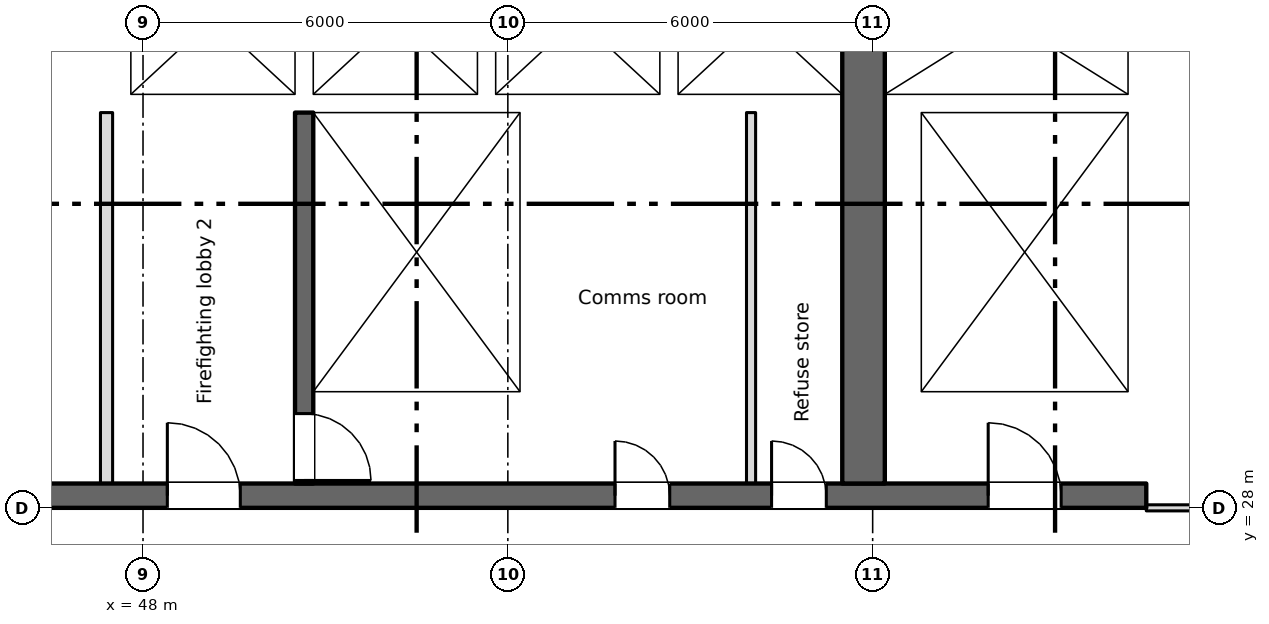
"""IFC4 building model, lengths in metres.
Left out: names, types, materials, properties, quantities, classifications, styles, units other than length and angle.
Written with IfcOpenShell. Run it as: python <this file> out.ifc"""

import sys

from ifc_helpers import new_model, si_unit, direction, frame, frame_2d, origin, place, context, subcontext, project, spatial, rectangle, extrude, element, fill, save


model = new_model("IFC4")
c1 = context("Model", 3, precision=1e-05, world=origin(), true_north=direction((0.0, 1.0)))
c2 = subcontext(c1, "Body", "Model", "MODEL_VIEW")
j1 = project(units=[si_unit("LENGTHUNIT", "METRE"), si_unit("PLANEANGLEUNIT", "RADIAN")], contexts=[c1])
p1 = place(None, origin())
s1 = spatial("IfcSite", under=j1, at=p1, CompositionType="ELEMENT")
p2 = place(p1, origin())
s2 = spatial("IfcBuilding", under=s1, at=p2, CompositionType="ELEMENT")
p3 = place(p2, frame((0.0, 0.0, 178.0)))
s3 = spatial("IfcBuildingStorey", under=s2, at=p3, CompositionType="ELEMENT", Elevation=178.0)
p4 = place(p3, frame((6.6, 28.2, 0.0), z_axis=(0.0, 0.0, 1.0), x_axis=(1.0, 0.0, 0.0)))
e1 = element("IfcWall", 1, at=p4, inside=s3, PredefinedType="SHEAR", context=c2, shape_type="SweptSolid", body=[
    extrude(rectangle(XDim=57.9, YDim=0.4, at=frame_2d((28.95, 0.0))), origin(), (0.0, 0.0, 1.0), 3.35),
])
p5 = place(p4, frame((12.163, 0.0, 0.0)))
e2 = element("IfcOpeningElement", 2, at=p5, cuts=e1, PredefinedType="OPENING", context=c2, shape_type="SweptSolid", body=[
    extrude(rectangle(XDim=0.9, YDim=2.1, at=frame_2d((0.45, 1.05))), frame((0.0, 0.21, 0.0), z_axis=(0.0, -1.0, 0.0), x_axis=(1.0, 0.0, 0.0)), (0.0, 0.0, 1.0), 0.42),
])
p6 = place(p4, frame((14.738, 0.0, 0.0)))
e3 = element("IfcOpeningElement", 3, at=p6, cuts=e1, PredefinedType="OPENING", context=c2, shape_type="SweptSolid", body=[
    extrude(rectangle(XDim=0.9, YDim=2.1, at=frame_2d((0.45, 1.05))), frame((0.0, 0.21, 0.0), z_axis=(0.0, -1.0, 0.0), x_axis=(1.0, 0.0, 0.0)), (0.0, 0.0, 1.0), 0.42),
])
p7 = place(p4, frame((49.163, 0.0, 0.0)))
e4 = element("IfcOpeningElement", 4, at=p7, cuts=e1, PredefinedType="OPENING", context=c2, shape_type="SweptSolid", body=[
    extrude(rectangle(XDim=0.9, YDim=2.1, at=frame_2d((0.45, 1.05))), frame((0.0, 0.21, 0.0), z_axis=(0.0, -1.0, 0.0), x_axis=(1.0, 0.0, 0.0)), (0.0, 0.0, 1.0), 0.42),
])
p8 = place(p4, frame((51.738, 0.0, 0.0)))
e5 = element("IfcOpeningElement", 5, at=p8, cuts=e1, PredefinedType="OPENING", context=c2, shape_type="SweptSolid", body=[
    extrude(rectangle(XDim=0.9, YDim=2.1, at=frame_2d((0.45, 1.05))), frame((0.0, 0.21, 0.0), z_axis=(0.0, -1.0, 0.0), x_axis=(1.0, 0.0, 0.0)), (0.0, 0.0, 1.0), 0.42),
])
p9 = place(p4, frame((1.45, 0.0, 0.0)))
e6 = element("IfcOpeningElement", 6, at=p9, cuts=e1, PredefinedType="OPENING", context=c2, shape_type="SweptSolid", body=[
    extrude(rectangle(XDim=0.9, YDim=2.1, at=frame_2d((0.45, 1.05))), frame((0.0, 0.21, 0.0), z_axis=(0.0, -1.0, 0.0), x_axis=(1.0, 0.0, 0.0)), (0.0, 0.0, 1.0), 0.42),
])
p10 = place(p4, frame((4.8, 0.0, 0.0)))
e7 = element("IfcOpeningElement", 7, at=p10, cuts=e1, PredefinedType="OPENING", context=c2, shape_type="SweptSolid", body=[
    extrude(rectangle(XDim=1.2, YDim=2.1, at=frame_2d((0.6, 1.05))), frame((0.0, 0.21, 0.0), z_axis=(0.0, -1.0, 0.0), x_axis=(1.0, 0.0, 0.0)), (0.0, 0.0, 1.0), 0.42),
])
p11 = place(p4, frame((31.8, 0.0, 0.0)))
e8 = element("IfcOpeningElement", 8, at=p11, cuts=e1, PredefinedType="OPENING", context=c2, shape_type="SweptSolid", body=[
    extrude(rectangle(XDim=1.2, YDim=2.1, at=frame_2d((0.6, 1.05))), frame((0.0, 0.21, 0.0), z_axis=(0.0, -1.0, 0.0), x_axis=(1.0, 0.0, 0.0)), (0.0, 0.0, 1.0), 0.42),
])
p12 = place(p4, frame((55.3, 0.0, 0.0)))
e9 = element("IfcOpeningElement", 9, at=p12, cuts=e1, PredefinedType="OPENING", context=c2, shape_type="SweptSolid", body=[
    extrude(rectangle(XDim=1.2, YDim=2.1, at=frame_2d((0.6, 1.05))), frame((0.0, 0.21, 0.0), z_axis=(0.0, -1.0, 0.0), x_axis=(1.0, 0.0, 0.0)), (0.0, 0.0, 1.0), 0.42),
])
p13 = place(p4, frame((21.8, 0.0, 0.0)))
e10 = element("IfcOpeningElement", 10, at=p13, cuts=e1, PredefinedType="OPENING", context=c2, shape_type="SweptSolid", body=[
    extrude(rectangle(XDim=1.2, YDim=2.1, at=frame_2d((0.6, 1.05))), frame((0.0, 0.21, 0.0), z_axis=(0.0, -1.0, 0.0), x_axis=(1.0, 0.0, 0.0)), (0.0, 0.0, 1.0), 0.42),
])
p14 = place(p4, frame((41.8, 0.0, 0.0)))
e11 = element("IfcOpeningElement", 11, at=p14, cuts=e1, PredefinedType="OPENING", context=c2, shape_type="SweptSolid", body=[
    extrude(rectangle(XDim=1.2, YDim=2.1, at=frame_2d((0.6, 1.05))), frame((0.0, 0.21, 0.0), z_axis=(0.0, -1.0, 0.0), x_axis=(1.0, 0.0, 0.0)), (0.0, 0.0, 1.0), 0.42),
])
p15 = place(p4, frame((24.95, 0.0, 0.0)))
e12 = element("IfcOpeningElement", 12, at=p15, cuts=e1, PredefinedType="OPENING", context=c2, shape_type="SweptSolid", body=[
    extrude(rectangle(XDim=2.4, YDim=2.1, at=frame_2d((1.2, 1.05))), frame((0.0, 0.21, 0.0), z_axis=(0.0, -1.0, 0.0), x_axis=(1.0, 0.0, 0.0)), (0.0, 0.0, 1.0), 0.42),
])
p16 = place(p4, frame((37.45, 0.0, 0.0)))
e13 = element("IfcOpeningElement", 13, at=p16, cuts=e1, PredefinedType="OPENING", context=c2, shape_type="SweptSolid", body=[
    extrude(rectangle(XDim=2.4, YDim=2.1, at=frame_2d((1.2, 1.05))), frame((0.0, 0.21, 0.0), z_axis=(0.0, -1.0, 0.0), x_axis=(1.0, 0.0, 0.0)), (0.0, 0.0, 1.0), 0.42),
])
p17 = place(p4, frame((8.1, 0.0, 0.0)))
e14 = element("IfcOpeningElement", 14, at=p17, cuts=e1, PredefinedType="OPENING", context=c2, shape_type="SweptSolid", body=[
    extrude(rectangle(XDim=2.4, YDim=2.1, at=frame_2d((1.2, 1.05))), frame((0.0, 0.21, 0.0), z_axis=(0.0, -1.0, 0.0), x_axis=(1.0, 0.0, 0.0)), (0.0, 0.0, 1.0), 0.42),
])
p18 = place(p4, frame((28.95, 0.0, 0.0)))
e15 = element("IfcOpeningElement", 15, at=p18, cuts=e1, PredefinedType="OPENING", context=c2, shape_type="SweptSolid", body=[
    extrude(rectangle(XDim=0.9, YDim=2.1, at=frame_2d((0.45, 1.05))), frame((0.0, 0.21, 0.0), z_axis=(0.0, -1.0, 0.0), x_axis=(1.0, 0.0, 0.0)), (0.0, 0.0, 1.0), 0.42),
])
p19 = place(p4, frame((34.95, 0.0, 0.0)))
e16 = element("IfcOpeningElement", 16, at=p19, cuts=e1, PredefinedType="OPENING", context=c2, shape_type="SweptSolid", body=[
    extrude(rectangle(XDim=0.9, YDim=2.1, at=frame_2d((0.45, 1.05))), frame((0.0, 0.21, 0.0), z_axis=(0.0, -1.0, 0.0), x_axis=(1.0, 0.0, 0.0)), (0.0, 0.0, 1.0), 0.42),
])
p20 = place(p3, frame((64.35, 34.8, 0.0), z_axis=(0.0, 0.0, 1.0), x_axis=(0.0, 1.0, 0.0)))
e17 = element("IfcWall", 17, at=p20, inside=s3, PredefinedType="SHEAR", context=c2, shape_type="SweptSolid", body=[
    extrude(rectangle(XDim=10.5, YDim=0.3, at=frame_2d((5.25, 0.0))), origin(), (0.0, 0.0, 1.0), 3.35),
])
p21 = place(p3, frame((59.85, 28.4, 0.0), z_axis=(0.0, 0.0, 1.0), x_axis=(0.0, 1.0, 0.0)))
e18 = element("IfcWall", 18, at=p21, inside=s3, PredefinedType="SHEAR", context=c2, shape_type="SweptSolid", body=[
    extrude(rectangle(XDim=16.9, YDim=0.7, at=frame_2d((8.45, 0.0))), origin(), (0.0, 0.0, 1.0), 3.35),
])
p22 = place(p21, frame((9.6, 0.0, 0.0)))
e19 = element("IfcOpeningElement", 19, at=p22, cuts=e18, PredefinedType="OPENING", context=c2, shape_type="SweptSolid", body=[
    extrude(rectangle(XDim=2.0, YDim=2.1, at=frame_2d((1.0, 1.05))), frame((0.0, 0.36, 0.0), z_axis=(0.0, -1.0, 0.0), x_axis=(1.0, 0.0, 0.0)), (0.0, 0.0, 1.0), 0.72),
])
p23 = place(p21, frame((15.4, 0.0, 0.0)))
e20 = element("IfcOpeningElement", 20, at=p23, cuts=e18, PredefinedType="OPENING", context=c2, shape_type="SweptSolid", body=[
    extrude(rectangle(XDim=1.2, YDim=2.1, at=frame_2d((0.6, 1.05))), frame((0.0, 0.36, 0.0), z_axis=(0.0, -1.0, 0.0), x_axis=(1.0, 0.0, 0.0)), (0.0, 0.0, 1.0), 0.72),
])
p24 = place(p3, frame((50.65, 34.5, 0.0), z_axis=(0.0, 0.0, 1.0), x_axis=(0.0, -1.0, 0.0)))
e21 = element("IfcWall", 21, at=p24, inside=s3, PredefinedType="SHEAR", context=c2, shape_type="SweptSolid", body=[
    extrude(rectangle(XDim=6.1, YDim=0.3, at=frame_2d((3.05, 0.0))), origin(), (0.0, 0.0, 1.0), 3.35),
])
p25 = place(p24, frame((4.95, 0.0, 0.0)))
e22 = element("IfcOpeningElement", 22, at=p25, cuts=e21, PredefinedType="OPENING", context=c2, shape_type="SweptSolid", body=[
    extrude(rectangle(XDim=1.1, YDim=2.1, at=frame_2d((0.55, 1.05))), frame((0.0, 0.16, 0.0), z_axis=(0.0, -1.0, 0.0), x_axis=(1.0, 0.0, 0.0)), (0.0, 0.0, 1.0), 0.32),
])
p26 = place(p3, frame((54.35, 28.4, 0.0), z_axis=(0.0, 0.0, 1.0), x_axis=(0.0, 1.0, 0.0)))
e23 = element("IfcWall", 23, at=p26, inside=s3, PredefinedType="SHEAR", context=c2, shape_type="SweptSolid", body=[
    extrude(rectangle(XDim=6.1, YDim=0.3, at=frame_2d((3.05, 0.0))), origin(), (0.0, 0.0, 1.0), 3.35),
])
p27 = place(p3, frame((60.5, 28.4, 0.0), z_axis=(0.0, 0.0, 1.0), x_axis=(0.0, 1.0, 0.0)))
e24 = element("IfcWall", 24, at=p27, inside=s3, PredefinedType="SHEAR", context=c2, shape_type="SweptSolid", body=[
    extrude(rectangle(XDim=6.1, YDim=0.6, at=frame_2d((3.05, 0.0))), origin(), (0.0, 0.0, 1.0), 3.35),
])
p28 = place(p3, frame((64.35, 28.4, 0.0), z_axis=(0.0, 0.0, 1.0), x_axis=(0.0, 1.0, 0.0)))
e25 = element("IfcWall", 25, at=p28, inside=s3, PredefinedType="SHEAR", context=c2, shape_type="SweptSolid", body=[
    extrude(rectangle(XDim=6.1, YDim=0.3, at=frame_2d((3.05, 0.0))), origin(), (0.0, 0.0, 1.0), 3.35),
])
p29 = place(p3, frame((47.3, 34.65, 0.0), z_axis=(0.0, 0.0, 1.0), x_axis=(1.0, 0.0, 0.0)))
e26 = element("IfcWall", 26, at=p29, inside=s3, PredefinedType="SHEAR", context=c2, shape_type="SweptSolid", body=[
    extrude(rectangle(XDim=12.2, YDim=0.3, at=frame_2d((6.1, 0.0))), origin(), (0.0, 0.0, 1.0), 3.35),
])
p30 = place(p29, frame((1.3, 0.0, 0.0)))
e27 = element("IfcOpeningElement", 27, at=p30, cuts=e26, PredefinedType="OPENING", context=c2, shape_type="SweptSolid", body=[
    extrude(rectangle(XDim=1.1, YDim=2.1, at=frame_2d((0.55, 1.05))), frame((0.0, 0.16, 0.0), z_axis=(0.0, -1.0, 0.0), x_axis=(1.0, 0.0, 0.0)), (0.0, 0.0, 1.0), 0.32),
])
p31 = place(p3, frame((60.2, 34.65, 0.0), z_axis=(0.0, 0.0, 1.0), x_axis=(1.0, 0.0, 0.0)))
e28 = element("IfcWall", 28, at=p31, inside=s3, PredefinedType="SHEAR", context=c2, shape_type="SweptSolid", body=[
    extrude(rectangle(XDim=4.3, YDim=0.3, at=frame_2d((2.15, 0.0))), origin(), (0.0, 0.0, 1.0), 3.35),
])
p32 = place(p3, frame((47.55, 34.8, 0.0), z_axis=(0.0, 0.0, 1.0), x_axis=(0.0, 1.0, 0.0)))
e29 = element("IfcWall", 29, at=p32, inside=s3, PredefinedType="SHEAR", context=c2, shape_type="SweptSolid", body=[
    extrude(rectangle(XDim=2.5, YDim=0.5, at=frame_2d((1.25, 0.0))), origin(), (0.0, 0.0, 1.0), 3.35),
])
for number, where, z_axis, x_axis in (
    (30, (50.65, 34.8, 0.0), (0.0, 0.0, 1.0), (0.0, 1.0, 0.0)),
    (31, (53.65, 34.8, 0.0), (0.0, 0.0, 1.0), (0.0, 1.0, 0.0)),
    (32, (56.65, 34.8, 0.0), (0.0, 0.0, 1.0), (0.0, 1.0, 0.0)),
):
    element("IfcWall", number, at=place(p3, frame(where, z_axis=z_axis, x_axis=x_axis)), inside=s3, PredefinedType="SHEAR", context=c2, shape_type="SweptSolid", body=[
        extrude(rectangle(XDim=2.5, YDim=0.3, at=frame_2d((1.25, 0.0))), origin(), (0.0, 0.0, 1.0), 3.35),
    ])
p33 = place(p3, frame((47.4, 28.4, 0.0), z_axis=(0.0, 0.0, 1.0), x_axis=(0.0, 1.0, 0.0)))
e33 = element("IfcWall", 33, at=p33, inside=s3, PredefinedType="PARTITIONING", context=c2, shape_type="SweptSolid", body=[
    extrude(rectangle(XDim=6.1, YDim=0.2, at=frame_2d((3.05, 0.0))), origin(), (0.0, 0.0, 1.0), 3.35),
])
p34 = place(p3, frame((58.0, 28.4, 0.0), z_axis=(0.0, 0.0, 1.0), x_axis=(0.0, 1.0, 0.0)))
e34 = element("IfcWall", 34, at=p34, inside=s3, PredefinedType="PARTITIONING", context=c2, shape_type="SweptSolid", body=[
    extrude(rectangle(XDim=6.1, YDim=0.15, at=frame_2d((3.05, 0.0))), origin(), (0.0, 0.0, 1.0), 3.35),
])
p35 = place(p3, frame((64.5, 28.0, 0.0), z_axis=(0.0, 0.0, 1.0), x_axis=(1.0, 0.0, 0.0)))
e35 = element("IfcWall", 35, at=p35, inside=s3, PredefinedType="PARTITIONING", context=c2, shape_type="SweptSolid", body=[
    extrude(rectangle(XDim=6.9, YDim=0.1, at=frame_2d((3.45, 0.0))), origin(), (0.0, 0.0, 1.0), 3.35),
])
p36 = place(p35, frame((2.95, 0.0, 0.0)))
e36 = element("IfcOpeningElement", 36, at=p36, cuts=e35, PredefinedType="OPENING", context=c2, shape_type="SweptSolid", body=[
    extrude(rectangle(XDim=1.0, YDim=2.1, at=frame_2d((0.5, 1.05))), frame((0.0, 0.06, 0.0), z_axis=(0.0, -1.0, 0.0), x_axis=(1.0, 0.0, 0.0)), (0.0, 0.0, 1.0), 0.12),
])
p37 = place(p7, origin())
e37 = element("IfcDoor", 37, at=p37, inside=s3, OperationType="SINGLE_SWING_LEFT", PredefinedType="DOOR", context=c2, shape_type="SweptSolid", body=[
    extrude(rectangle(XDim=0.9, YDim=2.1, at=frame_2d((0.45, 1.05))), frame((0.0, 0.025, 0.0), z_axis=(0.0, -1.0, 0.0), x_axis=(1.0, 0.0, 0.0)), (0.0, 0.0, 1.0), 0.05),
])
fill(e4, e37)
p38 = place(p8, origin())
e38 = element("IfcDoor", 38, at=p38, inside=s3, OperationType="SINGLE_SWING_LEFT", PredefinedType="DOOR", context=c2, shape_type="SweptSolid", body=[
    extrude(rectangle(XDim=0.9, YDim=2.1, at=frame_2d((0.45, 1.05))), frame((0.0, 0.025, 0.0), z_axis=(0.0, -1.0, 0.0), x_axis=(1.0, 0.0, 0.0)), (0.0, 0.0, 1.0), 0.05),
])
fill(e5, e38)
p39 = place(p30, origin())
e39 = element("IfcDoor", 39, at=p39, inside=s3, OperationType="SLIDING_TO_LEFT", PredefinedType="DOOR", context=c2, shape_type="SweptSolid", body=[
    extrude(rectangle(XDim=1.1, YDim=2.1, at=frame_2d((0.55, 1.05))), frame((0.0, 0.025, 0.0), z_axis=(0.0, -1.0, 0.0), x_axis=(1.0, 0.0, 0.0)), (0.0, 0.0, 1.0), 0.05),
])
fill(e27, e39)
p40 = place(p25, origin())
e40 = element("IfcDoor", 40, at=p40, inside=s3, OperationType="SINGLE_SWING_RIGHT", PredefinedType="DOOR", context=c2, shape_type="SweptSolid", body=[
    extrude(rectangle(XDim=1.1, YDim=2.1, at=frame_2d((0.55, 1.05))), frame((0.0, 0.025, 0.0), z_axis=(0.0, -1.0, 0.0), x_axis=(1.0, 0.0, 0.0)), (0.0, 0.0, 1.0), 0.05),
])
fill(e22, e40)
p41 = place(p12, origin())
e41 = element("IfcDoor", 41, at=p41, inside=s3, OperationType="SINGLE_SWING_LEFT", PredefinedType="DOOR", context=c2, shape_type="SweptSolid", body=[
    extrude(rectangle(XDim=1.2, YDim=2.1, at=frame_2d((0.6, 1.05))), frame((0.0, 0.025, 0.0), z_axis=(0.0, -1.0, 0.0), x_axis=(1.0, 0.0, 0.0)), (0.0, 0.0, 1.0), 0.05),
])
fill(e9, e41)
p42 = place(p14, origin())
e42 = element("IfcDoor", 42, at=p42, inside=s3, OperationType="SINGLE_SWING_LEFT", PredefinedType="DOOR", context=c2, shape_type="SweptSolid", body=[
    extrude(rectangle(XDim=1.2, YDim=2.1, at=frame_2d((0.6, 1.05))), frame((0.0, 0.025, 0.0), z_axis=(0.0, -1.0, 0.0), x_axis=(1.0, 0.0, 0.0)), (0.0, 0.0, 1.0), 0.05),
])
fill(e11, e42)
save(model, sys.argv[1])
